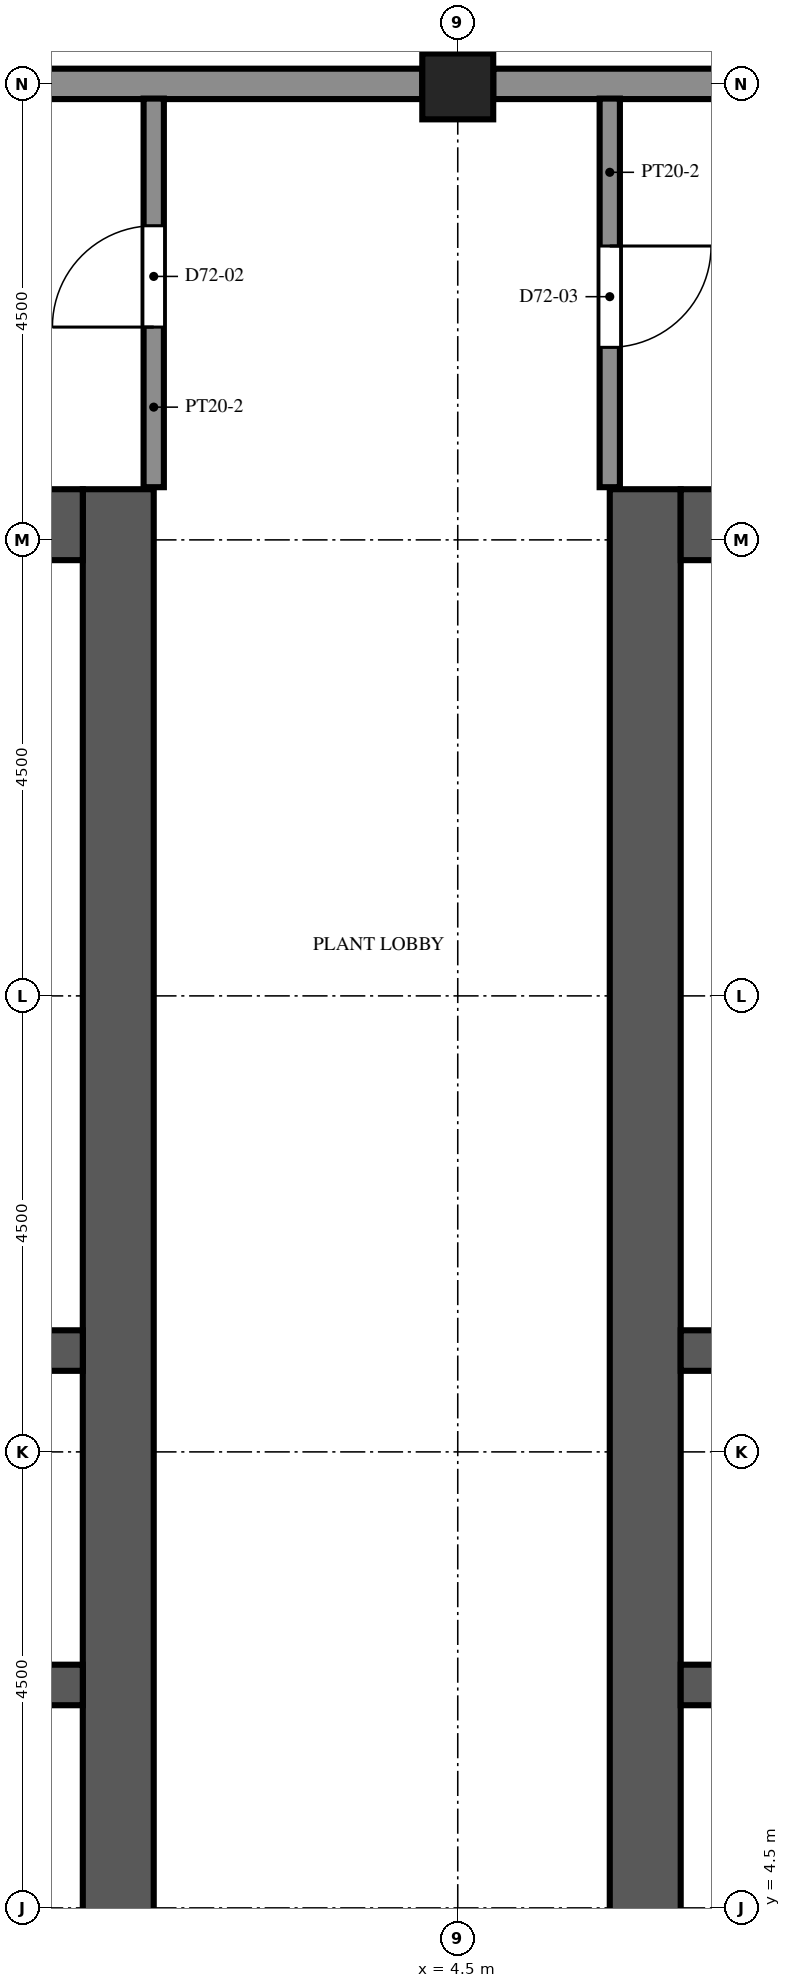
"""IFC4 building model, lengths in metres.
Left out: names, types, materials, properties, quantities, classifications, styles, units other than length and angle.
Written with IfcOpenShell. Run it as: python <this file> out.ifc"""

import sys

from ifc_helpers import new_model, si_unit, direction, frame, frame_2d, origin, origin_2d, place, context, subcontext, project, spatial, rectangle, extrude, element, fill, save


model = new_model("IFC4")
c1 = context("Model", 3, precision=1e-05, world=origin(), true_north=direction((0.0, 1.0)))
c2 = subcontext(c1, "Body", "Model", "MODEL_VIEW")
j1 = project(units=[si_unit("LENGTHUNIT", "METRE"), si_unit("PLANEANGLEUNIT", "RADIAN")], contexts=[c1])
p1 = place(None, origin())
s1 = spatial("IfcSite", under=j1, at=p1, CompositionType="ELEMENT")
p2 = place(p1, origin())
s2 = spatial("IfcBuilding", under=s1, at=p2, CompositionType="ELEMENT")
p3 = place(p2, frame((0.0, 0.0, 321.4)))
s3 = spatial("IfcBuildingStorey", under=s2, at=p3, CompositionType="ELEMENT", Elevation=321.4)
p4 = place(p3, frame((4.5, 22.5, 0.0), z_axis=(0.0, 0.0, 1.0), x_axis=(1.0, 0.0, 0.0)))
e1 = element("IfcColumn", 1, at=p4, inside=s3, PredefinedType="COLUMN", context=c2, shape_type="SweptSolid", body=[
    extrude(rectangle(XDim=0.7, YDim=0.7, at=origin_2d()), origin(), (0.0, 0.0, 1.0), 4.8),
])
p5 = place(p3, frame((1.15, -9.0, 0.0), z_axis=(0.0, 0.0, 1.0), x_axis=(0.0, 1.0, 0.0)))
e2 = element("IfcWall", 2, at=p5, inside=s3, PredefinedType="SHEAR", context=c2, shape_type="SweptSolid", body=[
    extrude(rectangle(XDim=27.5, YDim=0.7, at=frame_2d((13.75, 0.0))), origin(), (0.0, 0.0, 1.0), 4.8),
])
p6 = place(p5, frame((12.55, 0.0, 0.0)))
e3 = element("IfcOpeningElement", 3, at=p6, cuts=e2, PredefinedType="OPENING", context=c2, shape_type="SweptSolid", body=[
    extrude(rectangle(XDim=2.4, YDim=2.4, at=frame_2d((1.2, 1.2))), frame((0.0, 0.36, 0.0), z_axis=(0.0, -1.0, 0.0), x_axis=(1.0, 0.0, 0.0)), (0.0, 0.0, 1.0), 0.72),
])
p7 = place(p5, frame((5.42, 0.0, 0.0)))
e4 = element("IfcOpeningElement", 4, at=p7, cuts=e2, PredefinedType="OPENING", context=c2, shape_type="SweptSolid", body=[
    extrude(rectangle(XDim=1.2, YDim=2.1, at=frame_2d((0.6, 1.05))), frame((0.0, 0.36, 0.0), z_axis=(0.0, -1.0, 0.0), x_axis=(1.0, 0.0, 0.0)), (0.0, 0.0, 1.0), 0.72),
])
p8 = place(p5, frame((19.46, 0.0, 0.0)))
e5 = element("IfcOpeningElement", 5, at=p8, cuts=e2, PredefinedType="OPENING", context=c2, shape_type="SweptSolid", body=[
    extrude(rectangle(XDim=1.0, YDim=2.1, at=frame_2d((0.5, 1.05))), frame((0.0, 0.36, 0.0), z_axis=(0.0, -1.0, 0.0), x_axis=(1.0, 0.0, 0.0)), (0.0, 0.0, 1.0), 0.72),
])
p9 = place(p5, frame((21.17, 0.0, 0.0)))
e6 = element("IfcOpeningElement", 6, at=p9, cuts=e2, PredefinedType="OPENING", context=c2, shape_type="SweptSolid", body=[
    extrude(rectangle(XDim=1.0, YDim=2.1, at=frame_2d((0.5, 1.05))), frame((0.0, 0.36, 0.0), z_axis=(0.0, -1.0, 0.0), x_axis=(1.0, 0.0, 0.0)), (0.0, 0.0, 1.0), 0.72),
])
p10 = place(p5, frame((23.26, 0.0, 0.0)))
e7 = element("IfcOpeningElement", 7, at=p10, cuts=e2, PredefinedType="OPENING", context=c2, shape_type="SweptSolid", body=[
    extrude(rectangle(XDim=1.0, YDim=2.1, at=frame_2d((0.5, 1.05))), frame((0.0, 0.36, 0.0), z_axis=(0.0, -1.0, 0.0), x_axis=(1.0, 0.0, 0.0)), (0.0, 0.0, 1.0), 0.72),
])
p11 = place(p5, frame((25.35, 0.0, 0.0)))
e8 = element("IfcOpeningElement", 8, at=p11, cuts=e2, PredefinedType="OPENING", context=c2, shape_type="SweptSolid", body=[
    extrude(rectangle(XDim=1.0, YDim=2.1, at=frame_2d((0.5, 1.05))), frame((0.0, 0.36, 0.0), z_axis=(0.0, -1.0, 0.0), x_axis=(1.0, 0.0, 0.0)), (0.0, 0.0, 1.0), 0.72),
])
p12 = place(p3, frame((-9.8, 18.15, 0.0), z_axis=(0.0, 0.0, 1.0), x_axis=(1.0, 0.0, 0.0)))
e9 = element("IfcWall", 9, at=p12, inside=s3, PredefinedType="SHEAR", context=c2, shape_type="SweptSolid", body=[
    extrude(rectangle(XDim=10.6, YDim=0.7, at=frame_2d((5.3, 0.0))), origin(), (0.0, 0.0, 1.0), 4.8),
])
p13 = place(p3, frame((-9.8, 6.7, 0.0), z_axis=(0.0, 0.0, 1.0), x_axis=(1.0, 0.0, 0.0)))
e10 = element("IfcWall", 10, at=p13, inside=s3, PredefinedType="SHEAR", context=c2, shape_type="SweptSolid", body=[
    extrude(rectangle(XDim=10.6, YDim=0.4, at=frame_2d((5.3, 0.0))), origin(), (0.0, 0.0, 1.0), 4.8),
])
p14 = place(p13, frame((0.738, 0.0, 0.0)))
e11 = element("IfcOpeningElement", 11, at=p14, cuts=e10, PredefinedType="OPENING", context=c2, shape_type="SweptSolid", body=[
    extrude(rectangle(XDim=1.0, YDim=2.1, at=frame_2d((0.5, 1.05))), frame((0.0, 0.21, 0.0), z_axis=(0.0, -1.0, 0.0), x_axis=(1.0, 0.0, 0.0)), (0.0, 0.0, 1.0), 0.42),
])
p15 = place(p13, frame((3.488, 0.0, 0.0)))
e12 = element("IfcOpeningElement", 12, at=p15, cuts=e10, PredefinedType="OPENING", context=c2, shape_type="SweptSolid", body=[
    extrude(rectangle(XDim=1.0, YDim=2.1, at=frame_2d((0.5, 1.05))), frame((0.0, 0.21, 0.0), z_axis=(0.0, -1.0, 0.0), x_axis=(1.0, 0.0, 0.0)), (0.0, 0.0, 1.0), 0.42),
])
p16 = place(p13, frame((6.113, 0.0, 0.0)))
e13 = element("IfcOpeningElement", 13, at=p16, cuts=e10, PredefinedType="OPENING", context=c2, shape_type="SweptSolid", body=[
    extrude(rectangle(XDim=1.0, YDim=2.1, at=frame_2d((0.5, 1.05))), frame((0.0, 0.21, 0.0), z_axis=(0.0, -1.0, 0.0), x_axis=(1.0, 0.0, 0.0)), (0.0, 0.0, 1.0), 0.42),
])
p17 = place(p13, frame((8.863, 0.0, 0.0)))
e14 = element("IfcOpeningElement", 14, at=p17, cuts=e10, PredefinedType="OPENING", context=c2, shape_type="SweptSolid", body=[
    extrude(rectangle(XDim=1.0, YDim=2.1, at=frame_2d((0.5, 1.05))), frame((0.0, 0.21, 0.0), z_axis=(0.0, -1.0, 0.0), x_axis=(1.0, 0.0, 0.0)), (0.0, 0.0, 1.0), 0.42),
])
p18 = place(p3, frame((-9.8, 10.0, 0.0), z_axis=(0.0, 0.0, 1.0), x_axis=(1.0, 0.0, 0.0)))
e15 = element("IfcWall", 15, at=p18, inside=s3, PredefinedType="SHEAR", context=c2, shape_type="SweptSolid", body=[
    extrude(rectangle(XDim=10.6, YDim=0.4, at=frame_2d((5.3, 0.0))), origin(), (0.0, 0.0, 1.0), 4.8),
])
p19 = place(p3, frame((6.35, -9.0, 0.0), z_axis=(0.0, 0.0, 1.0), x_axis=(0.0, 1.0, 0.0)))
e16 = element("IfcWall", 16, at=p19, inside=s3, PredefinedType="SHEAR", context=c2, shape_type="SweptSolid", body=[
    extrude(rectangle(XDim=27.5, YDim=0.7, at=frame_2d((13.75, 0.0))), origin(), (0.0, 0.0, 1.0), 4.8),
])
p20 = place(p19, frame((12.55, 0.0, 0.0)))
e17 = element("IfcOpeningElement", 17, at=p20, cuts=e16, PredefinedType="OPENING", context=c2, shape_type="SweptSolid", body=[
    extrude(rectangle(XDim=2.4, YDim=2.4, at=frame_2d((1.2, 1.2))), frame((0.0, 0.36, 0.0), z_axis=(0.0, -1.0, 0.0), x_axis=(1.0, 0.0, 0.0)), (0.0, 0.0, 1.0), 0.72),
])
p21 = place(p19, frame((3.9, 0.0, 0.0)))
e18 = element("IfcOpeningElement", 18, at=p21, cuts=e16, PredefinedType="OPENING", context=c2, shape_type="SweptSolid", body=[
    extrude(rectangle(XDim=1.2, YDim=2.1, at=frame_2d((0.6, 1.05))), frame((0.0, 0.36, 0.0), z_axis=(0.0, -1.0, 0.0), x_axis=(1.0, 0.0, 0.0)), (0.0, 0.0, 1.0), 0.72),
])
p22 = place(p19, frame((22.4, 0.0, 0.0)))
e19 = element("IfcOpeningElement", 19, at=p22, cuts=e16, PredefinedType="OPENING", context=c2, shape_type="SweptSolid", body=[
    extrude(rectangle(XDim=1.2, YDim=2.1, at=frame_2d((0.6, 1.05))), frame((0.0, 0.36, 0.0), z_axis=(0.0, -1.0, 0.0), x_axis=(1.0, 0.0, 0.0)), (0.0, 0.0, 1.0), 0.72),
])
p23 = place(p3, frame((6.7, 18.15, 0.0), z_axis=(0.0, 0.0, 1.0), x_axis=(1.0, 0.0, 0.0)))
e20 = element("IfcWall", 20, at=p23, inside=s3, PredefinedType="SHEAR", context=c2, shape_type="SweptSolid", body=[
    extrude(rectangle(XDim=10.6, YDim=0.7, at=frame_2d((5.3, 0.0))), origin(), (0.0, 0.0, 1.0), 4.8),
])
p24 = place(p3, frame((6.7, 6.7, 0.0), z_axis=(0.0, 0.0, 1.0), x_axis=(1.0, 0.0, 0.0)))
e21 = element("IfcWall", 21, at=p24, inside=s3, PredefinedType="SHEAR", context=c2, shape_type="SweptSolid", body=[
    extrude(rectangle(XDim=10.6, YDim=0.4, at=frame_2d((5.3, 0.0))), origin(), (0.0, 0.0, 1.0), 4.8),
])
p25 = place(p24, frame((0.738, 0.0, 0.0)))
e22 = element("IfcOpeningElement", 22, at=p25, cuts=e21, PredefinedType="OPENING", context=c2, shape_type="SweptSolid", body=[
    extrude(rectangle(XDim=1.0, YDim=2.1, at=frame_2d((0.5, 1.05))), frame((0.0, 0.21, 0.0), z_axis=(0.0, -1.0, 0.0), x_axis=(1.0, 0.0, 0.0)), (0.0, 0.0, 1.0), 0.42),
])
p26 = place(p24, frame((3.488, 0.0, 0.0)))
e23 = element("IfcOpeningElement", 23, at=p26, cuts=e21, PredefinedType="OPENING", context=c2, shape_type="SweptSolid", body=[
    extrude(rectangle(XDim=1.0, YDim=2.1, at=frame_2d((0.5, 1.05))), frame((0.0, 0.21, 0.0), z_axis=(0.0, -1.0, 0.0), x_axis=(1.0, 0.0, 0.0)), (0.0, 0.0, 1.0), 0.42),
])
p27 = place(p24, frame((6.113, 0.0, 0.0)))
e24 = element("IfcOpeningElement", 24, at=p27, cuts=e21, PredefinedType="OPENING", context=c2, shape_type="SweptSolid", body=[
    extrude(rectangle(XDim=1.0, YDim=2.1, at=frame_2d((0.5, 1.05))), frame((0.0, 0.21, 0.0), z_axis=(0.0, -1.0, 0.0), x_axis=(1.0, 0.0, 0.0)), (0.0, 0.0, 1.0), 0.42),
])
p28 = place(p24, frame((8.863, 0.0, 0.0)))
e25 = element("IfcOpeningElement", 25, at=p28, cuts=e21, PredefinedType="OPENING", context=c2, shape_type="SweptSolid", body=[
    extrude(rectangle(XDim=1.0, YDim=2.1, at=frame_2d((0.5, 1.05))), frame((0.0, 0.21, 0.0), z_axis=(0.0, -1.0, 0.0), x_axis=(1.0, 0.0, 0.0)), (0.0, 0.0, 1.0), 0.42),
])
p29 = place(p3, frame((6.7, 10.0, 0.0), z_axis=(0.0, 0.0, 1.0), x_axis=(1.0, 0.0, 0.0)))
e26 = element("IfcWall", 26, at=p29, inside=s3, PredefinedType="SHEAR", context=c2, shape_type="SweptSolid", body=[
    extrude(rectangle(XDim=10.6, YDim=0.4, at=frame_2d((5.3, 0.0))), origin(), (0.0, 0.0, 1.0), 4.8),
])
for number, where, z_axis, x_axis in (
    (27, (8.65, 22.5, 0.0), (0.0, 0.0, 1.0), (-1.0, 0.0, 0.0)),
    (28, (4.15, 22.5, 0.0), (0.0, 0.0, 1.0), (-1.0, 0.0, 0.0)),
):
    element("IfcWall", number, at=place(p3, frame(where, z_axis=z_axis, x_axis=x_axis)), inside=s3, PredefinedType="SOLIDWALL", context=c2, shape_type="SweptSolid", body=[
        extrude(rectangle(XDim=3.8, YDim=0.3, at=frame_2d((1.9, 0.0))), origin(), (0.0, 0.0, 1.0), 0.85),
    ])
p30 = place(p3, frame((1.5, 18.52, 0.0), z_axis=(0.0, 0.0, 1.0), x_axis=(0.0, 1.0, 0.0)))
e29 = element("IfcWall", 29, at=p30, inside=s3, PredefinedType="PARTITIONING", context=c2, shape_type="SweptSolid", body=[
    extrude(rectangle(XDim=3.835, YDim=0.2, at=frame_2d((1.917, 0.0))), origin(), (0.0, 0.0, 1.0), 4.2),
])
p31 = place(p30, frame((1.58, 0.0, 0.0)))
e30 = element("IfcOpeningElement", 30, at=p31, cuts=e29, PredefinedType="OPENING", context=c2, shape_type="SweptSolid", body=[
    extrude(rectangle(XDim=1.0, YDim=2.1, at=frame_2d((0.5, 1.05))), frame((0.0, 0.11, 0.0), z_axis=(0.0, -1.0, 0.0), x_axis=(1.0, 0.0, 0.0)), (0.0, 0.0, 1.0), 0.22),
])
p32 = place(p3, frame((6.0, 22.355, 0.0), z_axis=(0.0, 0.0, 1.0), x_axis=(0.0, -1.0, 0.0)))
e31 = element("IfcWall", 31, at=p32, inside=s3, PredefinedType="PARTITIONING", context=c2, shape_type="SweptSolid", body=[
    extrude(rectangle(XDim=3.835, YDim=0.2, at=frame_2d((1.917, 0.0))), origin(), (0.0, 0.0, 1.0), 4.2),
])
p33 = place(p32, frame((1.455, 0.0, 0.0)))
e32 = element("IfcOpeningElement", 32, at=p33, cuts=e31, PredefinedType="OPENING", context=c2, shape_type="SweptSolid", body=[
    extrude(rectangle(XDim=1.0, YDim=2.1, at=frame_2d((0.5, 1.05))), frame((0.0, 0.11, 0.0), z_axis=(0.0, -1.0, 0.0), x_axis=(1.0, 0.0, 0.0)), (0.0, 0.0, 1.0), 0.22),
])
for number, where, z_axis, x_axis in (
    (33, (-4.3, 11.72, 0.0), (0.0, 0.0, 1.0), (1.0, 0.0, 0.0)),
    (34, (-4.3, 13.62, 0.0), (0.0, 0.0, 1.0), (1.0, 0.0, 0.0)),
    (35, (-4.3, 15.9, 0.0), (0.0, 0.0, 1.0), (1.0, 0.0, 0.0)),
):
    element("IfcWall", number, at=place(p3, frame(where, z_axis=z_axis, x_axis=x_axis)), inside=s3, PredefinedType="PARTITIONING", context=c2, shape_type="SweptSolid", body=[
        extrude(rectangle(XDim=5.1, YDim=0.1, at=frame_2d((2.55, 0.0))), origin(), (0.0, 0.0, 1.0), 4.2),
    ])
p34 = place(p31, origin())
e36 = element("IfcDoor", 36, at=p34, inside=s3, OperationType="SINGLE_SWING_LEFT", PredefinedType="DOOR", context=c2, shape_type="SweptSolid", body=[
    extrude(rectangle(XDim=1.0, YDim=2.1, at=frame_2d((0.5, 1.05))), frame((0.0, 0.025, 0.0), z_axis=(0.0, -1.0, 0.0), x_axis=(1.0, 0.0, 0.0)), (0.0, 0.0, 1.0), 0.05),
])
fill(e30, e36)
p35 = place(p33, origin())
e37 = element("IfcDoor", 37, at=p35, inside=s3, OperationType="SINGLE_SWING_LEFT", PredefinedType="DOOR", context=c2, shape_type="SweptSolid", body=[
    extrude(rectangle(XDim=1.0, YDim=2.1, at=frame_2d((0.5, 1.05))), frame((0.0, 0.025, 0.0), z_axis=(0.0, -1.0, 0.0), x_axis=(1.0, 0.0, 0.0)), (0.0, 0.0, 1.0), 0.05),
])
fill(e32, e37)
p36 = place(p6, origin())
e38 = element("IfcDoor", 38, at=p36, inside=s3, OperationType="DOUBLE_DOOR_DOUBLE_SWING", PredefinedType="DOOR", context=c2, shape_type="SweptSolid", body=[
    extrude(rectangle(XDim=2.4, YDim=2.4, at=frame_2d((1.2, 1.2))), frame((0.0, 0.025, 0.0), z_axis=(0.0, -1.0, 0.0), x_axis=(1.0, 0.0, 0.0)), (0.0, 0.0, 1.0), 0.05),
])
fill(e3, e38)
p37 = place(p20, origin())
e39 = element("IfcDoor", 39, at=p37, inside=s3, OperationType="DOUBLE_DOOR_DOUBLE_SWING", PredefinedType="DOOR", context=c2, shape_type="SweptSolid", body=[
    extrude(rectangle(XDim=2.4, YDim=2.4, at=frame_2d((1.2, 1.2))), frame((0.0, 0.025, 0.0), z_axis=(0.0, -1.0, 0.0), x_axis=(1.0, 0.0, 0.0)), (0.0, 0.0, 1.0), 0.05),
])
fill(e17, e39)
p38 = place(p8, origin())
e40 = element("IfcDoor", 40, at=p38, inside=s3, OperationType="SINGLE_SWING_LEFT", PredefinedType="DOOR", context=c2, shape_type="SweptSolid", body=[
    extrude(rectangle(XDim=1.0, YDim=2.1, at=frame_2d((0.5, 1.05))), frame((0.0, 0.325, 0.0), z_axis=(0.0, -1.0, 0.0), x_axis=(1.0, 0.0, 0.0)), (0.0, 0.0, 1.0), 0.05),
])
fill(e5, e40)
p39 = place(p9, origin())
e41 = element("IfcDoor", 41, at=p39, inside=s3, OperationType="SINGLE_SWING_RIGHT", PredefinedType="DOOR", context=c2, shape_type="SweptSolid", body=[
    extrude(rectangle(XDim=1.0, YDim=2.1, at=frame_2d((0.5, 1.05))), frame((0.0, 0.325, 0.0), z_axis=(0.0, -1.0, 0.0), x_axis=(1.0, 0.0, 0.0)), (0.0, 0.0, 1.0), 0.05),
])
fill(e6, e41)
p40 = place(p10, origin())
e42 = element("IfcDoor", 42, at=p40, inside=s3, OperationType="SINGLE_SWING_LEFT", PredefinedType="DOOR", context=c2, shape_type="SweptSolid", body=[
    extrude(rectangle(XDim=1.0, YDim=2.1, at=frame_2d((0.5, 1.05))), frame((0.0, 0.325, 0.0), z_axis=(0.0, -1.0, 0.0), x_axis=(1.0, 0.0, 0.0)), (0.0, 0.0, 1.0), 0.05),
])
fill(e7, e42)
p41 = place(p11, origin())
e43 = element("IfcDoor", 43, at=p41, inside=s3, OperationType="SINGLE_SWING_RIGHT", PredefinedType="DOOR", context=c2, shape_type="SweptSolid", body=[
    extrude(rectangle(XDim=1.0, YDim=2.1, at=frame_2d((0.5, 1.05))), frame((0.0, 0.325, 0.0), z_axis=(0.0, -1.0, 0.0), x_axis=(1.0, 0.0, 0.0)), (0.0, 0.0, 1.0), 0.05),
])
fill(e8, e43)
p42 = place(p22, origin())
e44 = element("IfcDoor", 44, at=p42, inside=s3, OperationType="SINGLE_SWING_RIGHT", PredefinedType="DOOR", context=c2, shape_type="SweptSolid", body=[
    extrude(rectangle(XDim=1.2, YDim=2.1, at=frame_2d((0.6, 1.05))), frame((0.0, -0.275, 0.0), z_axis=(0.0, -1.0, 0.0), x_axis=(1.0, 0.0, 0.0)), (0.0, 0.0, 1.0), 0.05),
])
fill(e19, e44)
save(model, sys.argv[1])
